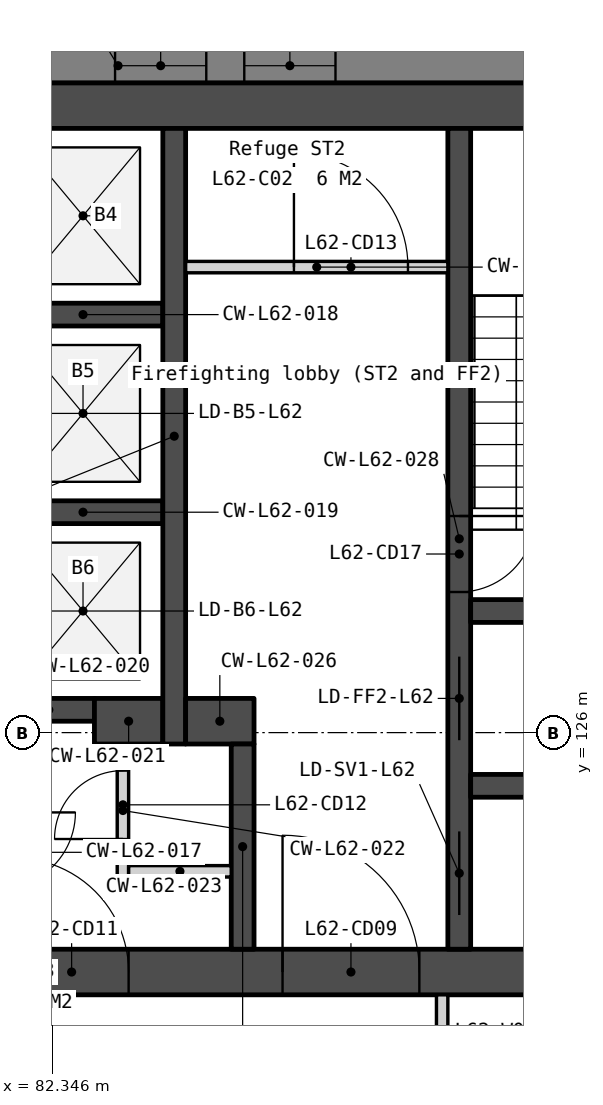
"""IFC4 building model, lengths in metres.
Left out: names, types, materials, properties, quantities, classifications, styles, units other than length and angle.
Written with IfcOpenShell. Run it as: python <this file> out.ifc"""

import sys

from ifc_helpers import new_model, si_unit, direction, frame, frame_2d, origin, place, context, subcontext, project, spatial, polyline, rectangle, outline, extrude, element, fill, save


model = new_model("IFC4")
c1 = context("Model", 3, precision=1e-05, world=origin(), true_north=direction((0.0, 1.0)))
c2 = subcontext(c1, "Body", "Model", "MODEL_VIEW")
j1 = project(units=[si_unit("LENGTHUNIT", "METRE"), si_unit("PLANEANGLEUNIT", "RADIAN")], contexts=[c1])
p1 = place(None, origin())
s1 = spatial("IfcSite", under=j1, at=p1, CompositionType="ELEMENT")
p2 = place(p1, origin())
s2 = spatial("IfcBuilding", under=s1, at=p2, CompositionType="ELEMENT")
p3 = place(p2, frame((0.0, 0.0, 254.3)))
s3 = spatial("IfcBuildingStorey", under=s2, at=p3, CompositionType="ELEMENT", Elevation=254.3)
p4 = place(p3, frame((69.0, 134.25, 0.0), z_axis=(0.0, 0.0, 1.0), x_axis=(1.0, 0.0, 0.0)))
e1 = element("IfcWall", 1, at=p4, inside=s3, PredefinedType="SOLIDWALL", context=c2, shape_type="SweptSolid", body=[
    extrude(rectangle(XDim=22.0, YDim=0.6, at=frame_2d((11.0, 0.0))), origin(), (0.0, 0.0, 1.0), 3.75),
])
p5 = place(p3, frame((69.0, 122.85, 0.0), z_axis=(0.0, 0.0, 1.0), x_axis=(1.0, 0.0, 0.0)))
e2 = element("IfcWall", 2, at=p5, inside=s3, PredefinedType="SOLIDWALL", context=c2, shape_type="SweptSolid", body=[
    extrude(rectangle(XDim=22.0, YDim=0.6, at=frame_2d((11.0, 0.0))), origin(), (0.0, 0.0, 1.0), 3.75),
])
p6 = place(p5, frame((16.375, 0.0, 0.0)))
e3 = element("IfcOpeningElement", 3, at=p6, cuts=e2, PredefinedType="OPENING", context=c2, shape_type="SweptSolid", body=[
    extrude(rectangle(XDim=1.8, YDim=2.1, at=frame_2d((0.9, 1.05))), frame((0.0, 0.31, 0.0), z_axis=(0.0, -1.0, 0.0), x_axis=(1.0, 0.0, 0.0)), (0.0, 0.0, 1.0), 0.62),
])
p7 = place(p5, frame((3.825, 0.0, 0.0)))
e4 = element("IfcOpeningElement", 4, at=p7, cuts=e2, PredefinedType="OPENING", context=c2, shape_type="SweptSolid", body=[
    extrude(rectangle(XDim=1.8, YDim=2.1, at=frame_2d((0.9, 1.05))), frame((0.0, 0.31, 0.0), z_axis=(0.0, -1.0, 0.0), x_axis=(1.0, 0.0, 0.0)), (0.0, 0.0, 1.0), 0.62),
])
p8 = place(p5, frame((12.85, 0.0, 0.0)))
e5 = element("IfcOpeningElement", 5, at=p8, cuts=e2, PredefinedType="OPENING", context=c2, shape_type="SweptSolid", body=[
    extrude(rectangle(XDim=1.5, YDim=2.1, at=frame_2d((0.75, 1.05))), frame((0.0, 0.31, 0.0), z_axis=(0.0, -1.0, 0.0), x_axis=(1.0, 0.0, 0.0)), (0.0, 0.0, 1.0), 0.62),
])
for number, where, z_axis, x_axis in (
    (6, (81.7, 131.5, 0.0), (0.0, 0.0, 1.0), (1.0, 0.0, 0.0)),
    (7, (81.7, 128.9, 0.0), (0.0, 0.0, 1.0), (1.0, 0.0, 0.0)),
):
    element("IfcWall", number, at=place(p3, frame(where, z_axis=z_axis, x_axis=x_axis)), inside=s3, PredefinedType="SOLIDWALL", context=c2, shape_type="SweptSolid", body=[
        extrude(rectangle(XDim=2.1, YDim=0.3, at=frame_2d((1.05, 0.0))), origin(), (0.0, 0.0, 1.0), 3.75),
    ])
p9 = place(p3, frame((81.7, 126.3, 0.0), z_axis=(0.0, 0.0, 1.0), x_axis=(1.0, 0.0, 0.0)))
e8 = element("IfcWall", 8, at=p9, inside=s3, PredefinedType="SOLIDWALL", context=c2, shape_type="SweptSolid", body=[
    extrude(rectangle(XDim=1.2, YDim=0.3, at=frame_2d((0.6, 0.0))), origin(), (0.0, 0.0, 1.0), 3.75),
])
p10 = place(p3, frame((82.9, 126.15, 0.0), z_axis=(0.0, 0.0, 1.0), x_axis=(1.0, 0.0, 0.0)))
e9 = element("IfcWall", 9, at=p10, inside=s3, PredefinedType="SOLIDWALL", context=c2, shape_type="SweptSolid", body=[
    extrude(rectangle(XDim=0.9, YDim=0.6, at=frame_2d((0.45, 0.0))), origin(), (0.0, 0.0, 1.0), 3.75),
])
p11 = place(p3, frame((83.275, 125.85, 0.0), z_axis=(0.0, 0.0, 1.0), x_axis=(0.0, -1.0, 0.0)))
e10 = element("IfcWall", 10, at=p11, inside=s3, PredefinedType="PARTITIONING", context=c2, shape_type="SweptSolid", body=[
    extrude(rectangle(XDim=1.75, YDim=0.15, at=frame_2d((0.875, 0.0))), origin(), (0.0, 0.0, 1.0), 3.75),
])
p12 = place(p11, frame((0.35, 0.0, 0.0)))
e11 = element("IfcOpeningElement", 11, at=p12, cuts=e10, PredefinedType="OPENING", context=c2, shape_type="SweptSolid", body=[
    extrude(rectangle(XDim=0.9, YDim=2.1, at=frame_2d((0.45, 1.05))), frame((0.0, 0.085, 0.0), z_axis=(0.0, -1.0, 0.0), x_axis=(1.0, 0.0, 0.0)), (0.0, 0.0, 1.0), 0.17),
])
p13 = place(p3, frame((83.35, 124.175, 0.0), z_axis=(0.0, 0.0, 1.0), x_axis=(1.0, 0.0, 0.0)))
e12 = element("IfcWall", 12, at=p13, inside=s3, PredefinedType="PARTITIONING", context=c2, shape_type="SweptSolid", body=[
    extrude(rectangle(XDim=1.35, YDim=0.15, at=frame_2d((0.675, 0.0))), origin(), (0.0, 0.0, 1.0), 3.75),
])
p14 = place(p3, frame((83.95, 133.95, 0.0), z_axis=(0.0, 0.0, 1.0), x_axis=(0.0, -1.0, 0.0)))
e13 = element("IfcWall", 13, at=p14, inside=s3, PredefinedType="SOLIDWALL", context=c2, shape_type="SweptSolid", body=[
    extrude(rectangle(XDim=8.1, YDim=0.3, at=frame_2d((4.05, 0.0))), origin(), (0.0, 0.0, 1.0), 3.75),
])
p15 = place(p3, frame((84.1, 132.125, 0.0), z_axis=(0.0, 0.0, 1.0), x_axis=(1.0, 0.0, 0.0)))
e14 = element("IfcWall", 14, at=p15, inside=s3, PredefinedType="PARTITIONING", context=c2, shape_type="SweptSolid", body=[
    extrude(rectangle(XDim=3.45, YDim=0.15, at=frame_2d((1.725, 0.0))), origin(), (0.0, 0.0, 1.0), 3.75),
])
p16 = place(p15, frame((1.425, 0.0, 0.0)))
e15 = element("IfcOpeningElement", 15, at=p16, cuts=e14, PredefinedType="OPENING", context=c2, shape_type="SweptSolid", body=[
    extrude(rectangle(XDim=1.5, YDim=2.1, at=frame_2d((0.75, 1.05))), frame((0.0, 0.085, 0.0), z_axis=(0.0, -1.0, 0.0), x_axis=(1.0, 0.0, 0.0)), (0.0, 0.0, 1.0), 0.17),
])
p17 = place(p3, frame((84.1, 126.15, 0.0), z_axis=(0.0, 0.0, 1.0), x_axis=(1.0, 0.0, 0.0)))
e16 = element("IfcWall", 16, at=p17, inside=s3, PredefinedType="SOLIDWALL", context=c2, shape_type="SweptSolid", body=[
    extrude(rectangle(XDim=0.9, YDim=0.6, at=frame_2d((0.45, 0.0))), origin(), (0.0, 0.0, 1.0), 3.75),
])
p18 = place(p3, frame((84.85, 125.85, 0.0), z_axis=(0.0, 0.0, 1.0), x_axis=(0.0, -1.0, 0.0)))
e17 = element("IfcWall", 17, at=p18, inside=s3, PredefinedType="SOLIDWALL", context=c2, shape_type="SweptSolid", body=[
    extrude(rectangle(XDim=2.7, YDim=0.3, at=frame_2d((1.35, 0.0))), origin(), (0.0, 0.0, 1.0), 3.75),
])
p19 = place(p3, frame((87.7, 133.95, 0.0), z_axis=(0.0, 0.0, 1.0), x_axis=(0.0, -1.0, 0.0)))
e18 = element("IfcWall", 18, at=p19, inside=s3, PredefinedType="SOLIDWALL", context=c2, shape_type="SweptSolid", body=[
    extrude(rectangle(XDim=10.8, YDim=0.3, at=frame_2d((5.4, 0.0))), origin(), (0.0, 0.0, 1.0), 3.75),
])
p20 = place(p19, frame((6.95, 0.0, 0.0)))
e19 = element("IfcOpeningElement", 19, at=p20, cuts=e18, PredefinedType="OPENING", context=c2, shape_type="SweptSolid", body=[
    extrude(rectangle(XDim=1.1, YDim=2.1, at=frame_2d((0.55, 1.05))), frame((0.0, 0.16, 0.0), z_axis=(0.0, -1.0, 0.0), x_axis=(1.0, 0.0, 0.0)), (0.0, 0.0, 1.0), 0.32),
])
p21 = place(p19, frame((5.1, 0.0, 0.0)))
e20 = element("IfcOpeningElement", 20, at=p21, cuts=e18, PredefinedType="OPENING", context=c2, shape_type="SweptSolid", body=[
    extrude(rectangle(XDim=1.0, YDim=2.1, at=frame_2d((0.5, 1.05))), frame((0.0, 0.16, 0.0), z_axis=(0.0, -1.0, 0.0), x_axis=(1.0, 0.0, 0.0)), (0.0, 0.0, 1.0), 0.32),
])
p22 = place(p19, frame((9.25, 0.0, 0.0)))
e21 = element("IfcOpeningElement", 21, at=p22, cuts=e18, PredefinedType="OPENING", context=c2, shape_type="SweptSolid", body=[
    extrude(rectangle(XDim=1.1, YDim=2.1, at=frame_2d((0.55, 1.05))), frame((0.0, 0.16, 0.0), z_axis=(0.0, -1.0, 0.0), x_axis=(1.0, 0.0, 0.0)), (0.0, 0.0, 1.0), 0.32),
])
for number, where, z_axis, x_axis in (
    (22, (87.85, 127.6, 0.0), (0.0, 0.0, 1.0), (1.0, 0.0, 0.0)),
    (23, (87.85, 125.3, 0.0), (0.0, 0.0, 1.0), (1.0, 0.0, 0.0)),
):
    element("IfcWall", number, at=place(p3, frame(where, z_axis=z_axis, x_axis=x_axis)), inside=s3, PredefinedType="SOLIDWALL", context=c2, shape_type="SweptSolid", body=[
        extrude(rectangle(XDim=2.55, YDim=0.3, at=frame_2d((1.275, 0.0))), origin(), (0.0, 0.0, 1.0), 3.75),
    ])
p23 = place(p3, frame((98.486, 134.775, -0.15), z_axis=(0.0, 0.0, 1.0), x_axis=(-1.0, 0.0, 0.0)))
e24 = element("IfcWall", 24, at=p23, inside=s3, PredefinedType="SOLIDWALL", context=c2, shape_type="SweptSolid", body=[
    extrude(outline(polyline([(0.0, 0.0), (0.0, 3.9), (30.551, 3.9), (30.551, 0.0), (0.0, 0.0)])), frame((0.0, 0.225, 0.0), z_axis=(0.0, -1.0, 0.0), x_axis=(1.0, 0.0, 0.0)), (0.0, 0.0, 1.0), 0.45),
])
p24 = place(p23, frame((3.172, 0.0, 0.95)))
e25 = element("IfcOpeningElement", 25, at=p24, cuts=e24, PredefinedType="OPENING", context=c2, shape_type="SweptSolid", body=[
    extrude(rectangle(XDim=1.2, YDim=2.2, at=frame_2d((0.6, 1.1))), frame((0.0, 0.235, 0.0), z_axis=(0.0, -1.0, 0.0), x_axis=(1.0, 0.0, 0.0)), (0.0, 0.0, 1.0), 0.47),
])
p25 = place(p23, frame((4.872, 0.0, 0.95)))
e26 = element("IfcOpeningElement", 26, at=p25, cuts=e24, PredefinedType="OPENING", context=c2, shape_type="SweptSolid", body=[
    extrude(rectangle(XDim=1.2, YDim=2.2, at=frame_2d((0.6, 1.1))), frame((0.0, 0.235, 0.0), z_axis=(0.0, -1.0, 0.0), x_axis=(1.0, 0.0, 0.0)), (0.0, 0.0, 1.0), 0.47),
])
p26 = place(p23, frame((12.415, 0.0, 0.95)))
e27 = element("IfcOpeningElement", 27, at=p26, cuts=e24, PredefinedType="OPENING", context=c2, shape_type="SweptSolid", body=[
    extrude(rectangle(XDim=1.2, YDim=2.2, at=frame_2d((0.6, 1.1))), frame((0.0, 0.235, 0.0), z_axis=(0.0, -1.0, 0.0), x_axis=(1.0, 0.0, 0.0)), (0.0, 0.0, 1.0), 0.47),
])
p27 = place(p23, frame((14.115, 0.0, 0.95)))
e28 = element("IfcOpeningElement", 28, at=p27, cuts=e24, PredefinedType="OPENING", context=c2, shape_type="SweptSolid", body=[
    extrude(rectangle(XDim=1.2, YDim=2.2, at=frame_2d((0.6, 1.1))), frame((0.0, 0.235, 0.0), z_axis=(0.0, -1.0, 0.0), x_axis=(1.0, 0.0, 0.0)), (0.0, 0.0, 1.0), 0.47),
])
p28 = place(p23, frame((21.658, 0.0, 0.95)))
e29 = element("IfcOpeningElement", 29, at=p28, cuts=e24, PredefinedType="OPENING", context=c2, shape_type="SweptSolid", body=[
    extrude(rectangle(XDim=1.2, YDim=2.2, at=frame_2d((0.6, 1.1))), frame((0.0, 0.235, 0.0), z_axis=(0.0, -1.0, 0.0), x_axis=(1.0, 0.0, 0.0)), (0.0, 0.0, 1.0), 0.47),
])
p29 = place(p23, frame((23.358, 0.0, 0.95)))
e30 = element("IfcOpeningElement", 30, at=p29, cuts=e24, PredefinedType="OPENING", context=c2, shape_type="SweptSolid", body=[
    extrude(rectangle(XDim=1.2, YDim=2.2, at=frame_2d((0.6, 1.1))), frame((0.0, 0.235, 0.0), z_axis=(0.0, -1.0, 0.0), x_axis=(1.0, 0.0, 0.0)), (0.0, 0.0, 1.0), 0.47),
])
p30 = place(p3, frame((80.905, 101.188, -0.15), z_axis=(0.0, 0.0, 1.0), x_axis=(0.500002536638, 0.866023939251, 0.0)))
e31 = element("IfcWall", 31, at=p30, inside=s3, PredefinedType="SOLIDWALL", context=c2, shape_type="SweptSolid", body=[
    extrude(outline(polyline([(36.972, 0.0), (36.972, 3.9), (0.0, 3.9), (0.0, 0.0), (36.972, 0.0)])), frame((0.0, 0.225, 0.0), z_axis=(0.0, -1.0, 0.0), x_axis=(1.0, 0.0, 0.0)), (0.0, 0.0, 1.0), 0.45),
])
p31 = place(p30, frame((3.172, 0.0, 0.95)))
e32 = element("IfcOpeningElement", 32, at=p31, cuts=e31, PredefinedType="OPENING", context=c2, shape_type="SweptSolid", body=[
    extrude(rectangle(XDim=1.2, YDim=2.2, at=frame_2d((0.6, 1.1))), frame((0.0, 0.235, 0.0), z_axis=(0.0, -1.0, 0.0), x_axis=(1.0, 0.0, 0.0)), (0.0, 0.0, 1.0), 0.47),
])
p32 = place(p30, frame((4.872, 0.0, 0.95)))
e33 = element("IfcOpeningElement", 33, at=p32, cuts=e31, PredefinedType="OPENING", context=c2, shape_type="SweptSolid", body=[
    extrude(rectangle(XDim=1.2, YDim=2.2, at=frame_2d((0.6, 1.1))), frame((0.0, 0.235, 0.0), z_axis=(0.0, -1.0, 0.0), x_axis=(1.0, 0.0, 0.0)), (0.0, 0.0, 1.0), 0.47),
])
p33 = place(p30, frame((12.415, 0.0, 0.95)))
e34 = element("IfcOpeningElement", 34, at=p33, cuts=e31, PredefinedType="OPENING", context=c2, shape_type="SweptSolid", body=[
    extrude(rectangle(XDim=1.2, YDim=2.2, at=frame_2d((0.6, 1.1))), frame((0.0, 0.235, 0.0), z_axis=(0.0, -1.0, 0.0), x_axis=(1.0, 0.0, 0.0)), (0.0, 0.0, 1.0), 0.47),
])
p34 = place(p30, frame((14.115, 0.0, 0.95)))
e35 = element("IfcOpeningElement", 35, at=p34, cuts=e31, PredefinedType="OPENING", context=c2, shape_type="SweptSolid", body=[
    extrude(rectangle(XDim=1.2, YDim=2.2, at=frame_2d((0.6, 1.1))), frame((0.0, 0.235, 0.0), z_axis=(0.0, -1.0, 0.0), x_axis=(1.0, 0.0, 0.0)), (0.0, 0.0, 1.0), 0.47),
])
p35 = place(p30, frame((21.658, 0.0, 0.95)))
e36 = element("IfcOpeningElement", 36, at=p35, cuts=e31, PredefinedType="OPENING", context=c2, shape_type="SweptSolid", body=[
    extrude(rectangle(XDim=1.2, YDim=2.2, at=frame_2d((0.6, 1.1))), frame((0.0, 0.235, 0.0), z_axis=(0.0, -1.0, 0.0), x_axis=(1.0, 0.0, 0.0)), (0.0, 0.0, 1.0), 0.47),
])
p36 = place(p30, frame((23.358, 0.0, 0.95)))
e37 = element("IfcOpeningElement", 37, at=p36, cuts=e31, PredefinedType="OPENING", context=c2, shape_type="SweptSolid", body=[
    extrude(rectangle(XDim=1.2, YDim=2.2, at=frame_2d((0.6, 1.1))), frame((0.0, 0.235, 0.0), z_axis=(0.0, -1.0, 0.0), x_axis=(1.0, 0.0, 0.0)), (0.0, 0.0, 1.0), 0.47),
])
p37 = place(p30, frame((30.901, 0.0, 0.95)))
e38 = element("IfcOpeningElement", 38, at=p37, cuts=e31, PredefinedType="OPENING", context=c2, shape_type="SweptSolid", body=[
    extrude(rectangle(XDim=1.2, YDim=2.2, at=frame_2d((0.6, 1.1))), frame((0.0, 0.235, 0.0), z_axis=(0.0, -1.0, 0.0), x_axis=(1.0, 0.0, 0.0)), (0.0, 0.0, 1.0), 0.47),
])
p38 = place(p30, frame((32.601, 0.0, 0.95)))
e39 = element("IfcOpeningElement", 39, at=p38, cuts=e31, PredefinedType="OPENING", context=c2, shape_type="SweptSolid", body=[
    extrude(rectangle(XDim=1.2, YDim=2.2, at=frame_2d((0.6, 1.1))), frame((0.0, 0.235, 0.0), z_axis=(0.0, -1.0, 0.0), x_axis=(1.0, 0.0, 0.0)), (0.0, 0.0, 1.0), 0.47),
])
p39 = place(p3, frame((87.475, 120.025, 0.0), z_axis=(0.0, 0.0, 1.0), x_axis=(0.0, 1.0, 0.0)))
e40 = element("IfcWall", 40, at=p39, inside=s3, PredefinedType="PARTITIONING", context=c2, shape_type="SweptSolid", body=[
    extrude(rectangle(XDim=2.525, YDim=0.15, at=frame_2d((1.263, 0.0))), origin(), (0.0, 0.0, 1.0), 3.75),
])
p40 = place(p39, frame((0.762, 0.0, 0.0)))
e41 = element("IfcOpeningElement", 41, at=p40, cuts=e40, PredefinedType="OPENING", context=c2, shape_type="SweptSolid", body=[
    extrude(rectangle(XDim=1.0, YDim=2.1, at=frame_2d((0.5, 1.05))), frame((0.0, 0.085, 0.0), z_axis=(0.0, -1.0, 0.0), x_axis=(1.0, 0.0, 0.0)), (0.0, 0.0, 1.0), 0.17),
])
p41 = place(p20, origin())
e42 = element("IfcDoor", 42, at=p41, inside=s3, OperationType="SLIDING_TO_LEFT", PredefinedType="DOOR", context=c2, shape_type="SweptSolid", body=[
    extrude(rectangle(XDim=1.1, YDim=2.1, at=frame_2d((0.55, 1.05))), frame((0.0, 0.025, 0.0), z_axis=(0.0, -1.0, 0.0), x_axis=(1.0, 0.0, 0.0)), (0.0, 0.0, 1.0), 0.05),
])
fill(e19, e42)
p42 = place(p6, origin())
e43 = element("IfcDoor", 43, at=p42, inside=s3, OperationType="DOUBLE_DOOR_DOUBLE_SWING", PredefinedType="DOOR", context=c2, shape_type="SweptSolid", body=[
    extrude(rectangle(XDim=1.8, YDim=2.1, at=frame_2d((0.9, 1.05))), frame((0.0, 0.025, 0.0), z_axis=(0.0, -1.0, 0.0), x_axis=(1.0, 0.0, 0.0)), (0.0, 0.0, 1.0), 0.05),
])
fill(e3, e43)
p43 = place(p8, origin())
e44 = element("IfcDoor", 44, at=p43, inside=s3, OperationType="DOUBLE_DOOR_DOUBLE_SWING", PredefinedType="DOOR", context=c2, shape_type="SweptSolid", body=[
    extrude(rectangle(XDim=1.5, YDim=2.1, at=frame_2d((0.75, 1.05))), frame((0.0, 0.025, 0.0), z_axis=(0.0, -1.0, 0.0), x_axis=(1.0, 0.0, 0.0)), (0.0, 0.0, 1.0), 0.05),
])
fill(e5, e44)
p44 = place(p12, origin())
e45 = element("IfcDoor", 45, at=p44, inside=s3, OperationType="SINGLE_SWING_RIGHT", PredefinedType="DOOR", context=c2, shape_type="SweptSolid", body=[
    extrude(rectangle(XDim=0.9, YDim=2.1, at=frame_2d((0.45, 1.05))), frame((0.0, 0.025, 0.0), z_axis=(0.0, -1.0, 0.0), x_axis=(1.0, 0.0, 0.0)), (0.0, 0.0, 1.0), 0.05),
])
fill(e11, e45)
p45 = place(p16, origin())
e46 = element("IfcDoor", 46, at=p45, inside=s3, OperationType="DOUBLE_DOOR_DOUBLE_SWING", PredefinedType="DOOR", context=c2, shape_type="SweptSolid", body=[
    extrude(rectangle(XDim=1.5, YDim=2.1, at=frame_2d((0.75, 1.05))), frame((0.0, 0.025, 0.0), z_axis=(0.0, -1.0, 0.0), x_axis=(1.0, 0.0, 0.0)), (0.0, 0.0, 1.0), 0.05),
])
fill(e15, e46)
p46 = place(p21, origin())
e47 = element("IfcDoor", 47, at=p46, inside=s3, OperationType="SINGLE_SWING_LEFT", PredefinedType="DOOR", context=c2, shape_type="SweptSolid", body=[
    extrude(rectangle(XDim=1.0, YDim=2.1, at=frame_2d((0.5, 1.05))), frame((0.0, 0.025, 0.0), z_axis=(0.0, -1.0, 0.0), x_axis=(1.0, 0.0, 0.0)), (0.0, 0.0, 1.0), 0.05),
])
fill(e20, e47)
p47 = place(p22, origin())
e48 = element("IfcDoor", 48, at=p47, inside=s3, OperationType="SLIDING_TO_LEFT", PredefinedType="DOOR", context=c2, shape_type="SweptSolid", body=[
    extrude(rectangle(XDim=1.1, YDim=2.1, at=frame_2d((0.55, 1.05))), frame((0.0, 0.025, 0.0), z_axis=(0.0, -1.0, 0.0), x_axis=(1.0, 0.0, 0.0)), (0.0, 0.0, 1.0), 0.05),
])
fill(e21, e48)
p48 = place(p26, origin())
e49 = element("IfcWindow", 49, at=p48, inside=s3, PartitioningType="SINGLE_PANEL", PredefinedType="WINDOW", context=c2, shape_type="SweptSolid", body=[
    extrude(rectangle(XDim=1.2, YDim=2.2, at=frame_2d((0.6, 1.1))), frame((0.0, 0.03, 0.0), z_axis=(0.0, -1.0, 0.0), x_axis=(1.0, 0.0, 0.0)), (0.0, 0.0, 1.0), 0.06),
])
fill(e27, e49)
p49 = place(p27, origin())
e50 = element("IfcWindow", 50, at=p49, inside=s3, PartitioningType="SINGLE_PANEL", PredefinedType="WINDOW", context=c2, shape_type="SweptSolid", body=[
    extrude(rectangle(XDim=1.2, YDim=2.2, at=frame_2d((0.6, 1.1))), frame((0.0, 0.03, 0.0), z_axis=(0.0, -1.0, 0.0), x_axis=(1.0, 0.0, 0.0)), (0.0, 0.0, 1.0), 0.06),
])
fill(e28, e50)
save(model, sys.argv[1])
